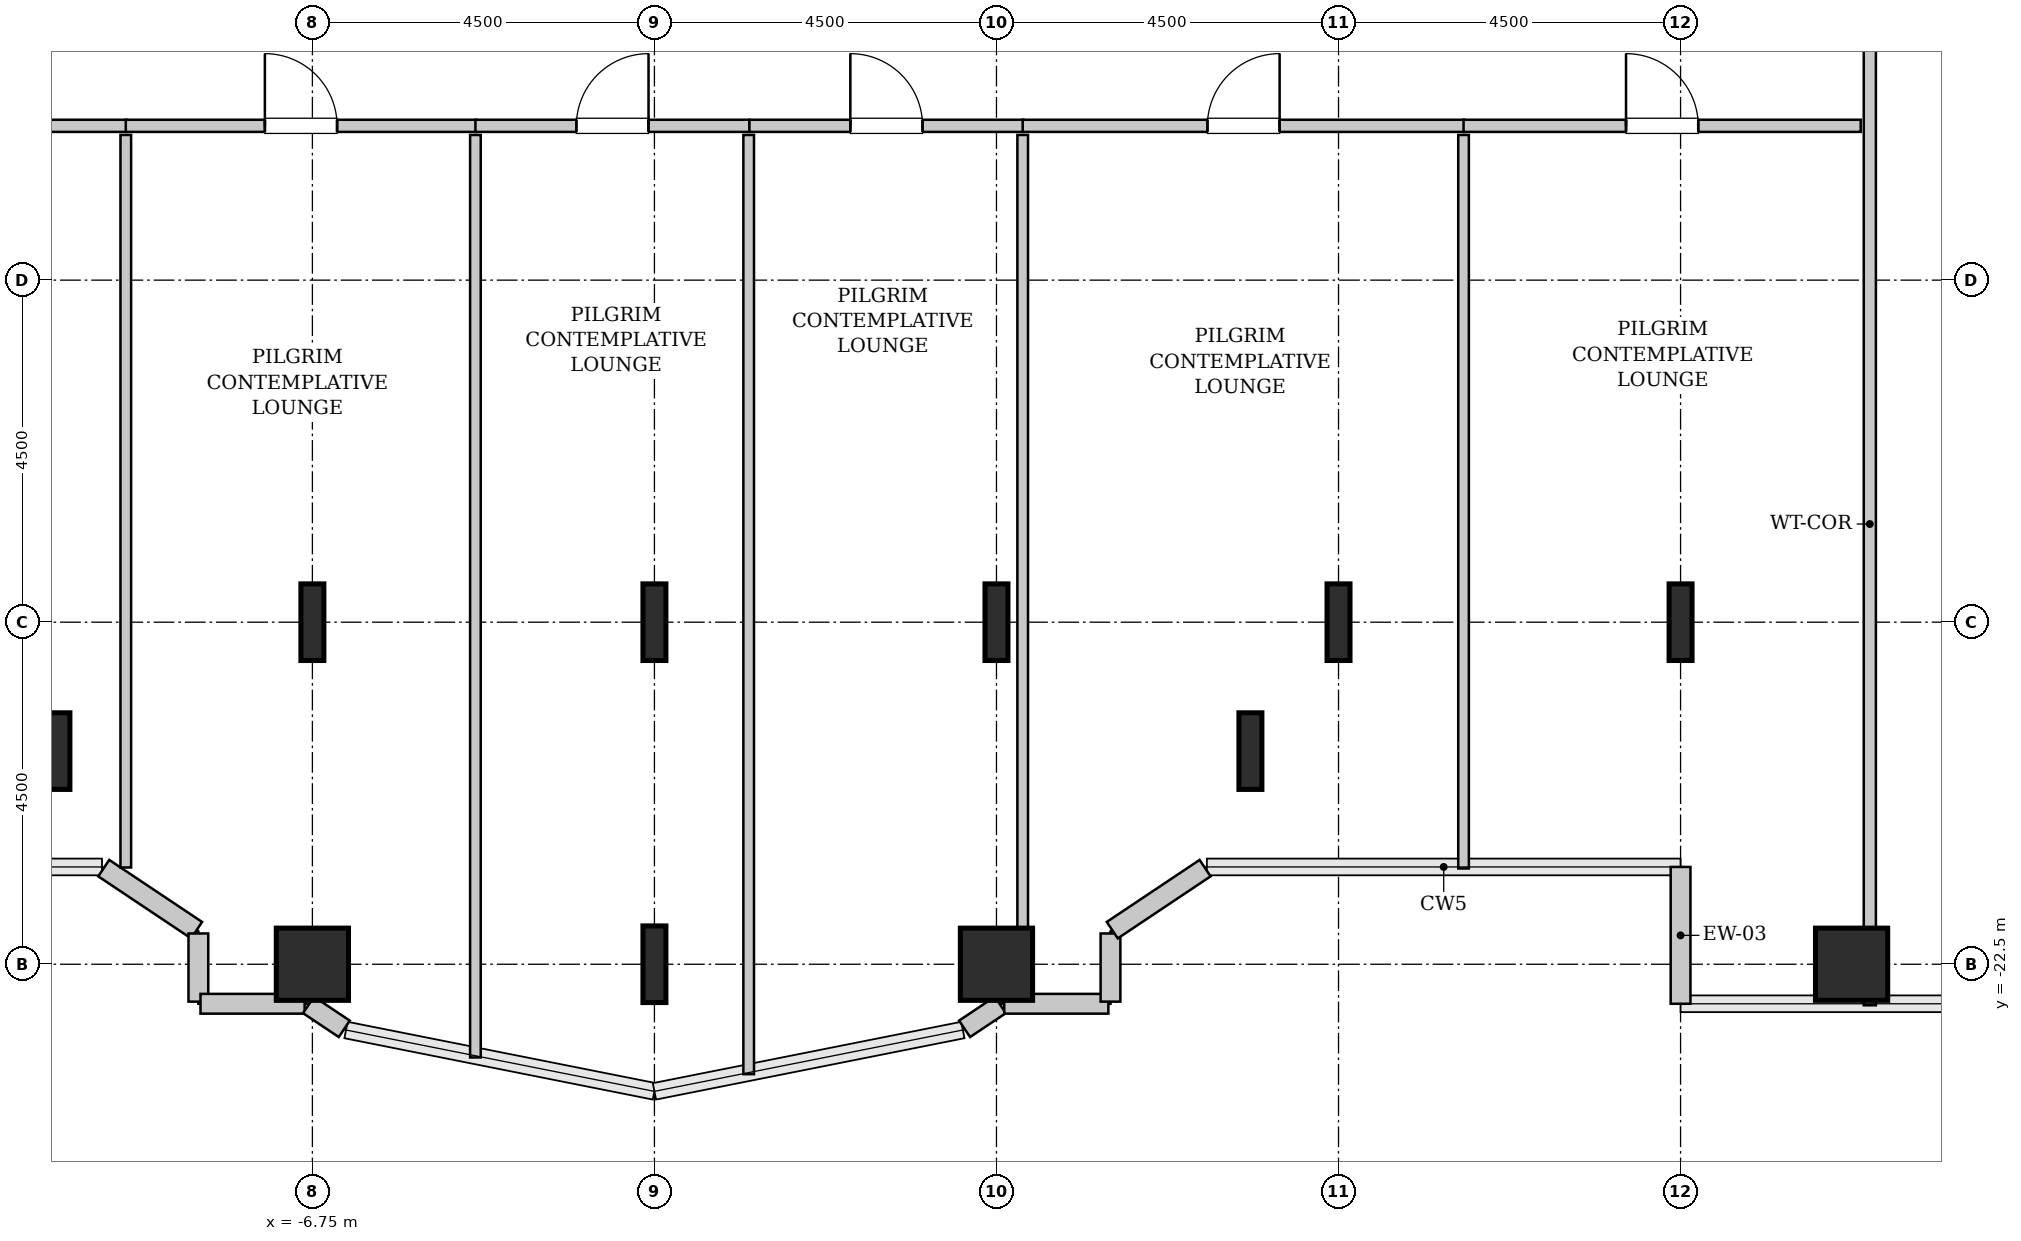
"""IFC4 building model, lengths in metres.
Left out: names, types, materials, properties, quantities, classifications, styles, units other than length and angle.
Written with IfcOpenShell. Run it as: python <this file> out.ifc"""

import sys

from ifc_helpers import new_model, si_unit, direction, frame, frame_2d, origin, origin_2d, place, context, subcontext, project, spatial, rectangle, hollow_rectangle, i_section, extrude, source, transform, mapped, element, fill, save


model = new_model("IFC4")
c1 = context("Model", 3, precision=1e-05, world=origin(), true_north=direction((0.0, 1.0)))
c2 = subcontext(c1, "Body", "Model", "MODEL_VIEW")
j1 = project(units=[si_unit("LENGTHUNIT", "METRE"), si_unit("PLANEANGLEUNIT", "RADIAN")], contexts=[c1])
p1 = place(None, origin())
s1 = spatial("IfcSite", under=j1, at=p1, CompositionType="ELEMENT")
p2 = place(p1, origin())
s2 = spatial("IfcBuilding", under=s1, at=p2, CompositionType="ELEMENT")
p3 = place(p2, frame((0.0, 0.0, 33.0)))
s3 = spatial("IfcBuildingStorey", under=s2, at=p3, CompositionType="ELEMENT", Elevation=33.0)
m1 = source(origin(), c2, "Body", "SweptSolid", [
    extrude(i_section(OverallWidth=0.302, OverallDepth=1.008, WebThickness=0.021, FlangeThickness=0.04, FilletRadius=0.03, at=origin_2d()), origin(), (0.0, 0.0, 1.0), 3.8),
])
p4 = place(p3, frame((-10.091, -19.696, 0.0), z_axis=(0.0, 0.0, 1.0), x_axis=(1.0, 0.0, 0.0)))
e1 = element("IfcColumn", 1, at=p4, inside=s3, PredefinedType="COLUMN", context=c2, shape_type="MappedRepresentation", body=[
    mapped(m1, transform((0.0, 0.0, 0.0), x_axis=(1.0, 0.0, 0.0), y_axis=(0.0, 1.0, 0.0), z_axis=(0.0, 0.0, 1.0), scale=1.0)),
])
m2 = source(origin(), c2, "Body", "SweptSolid", [
    extrude(hollow_rectangle(XDim=0.95, YDim=0.95, WallThickness=0.045, InnerFilletRadius=0.045, OuterFilletRadius=0.09, at=origin_2d()), origin(), (0.0, 0.0, 1.0), 3.8),
])
p5 = place(p3, frame((-6.75, -22.5, 0.0), z_axis=(0.0, 0.0, 1.0), x_axis=(1.0, 0.0, 0.0)))
e2 = element("IfcColumn", 2, at=p5, inside=s3, PredefinedType="COLUMN", context=c2, shape_type="MappedRepresentation", body=[
    mapped(m2, transform((0.0, 0.0, 0.0), x_axis=(1.0, 0.0, 0.0), y_axis=(0.0, 1.0, 0.0), z_axis=(0.0, 0.0, 1.0), scale=1.0)),
])
for number, where, z_axis, x_axis in (
    (3, (-6.75, -18.0, 0.0), (0.0, 0.0, 1.0), (1.0, 0.0, 0.0)),
    (4, (-2.25, -22.5, 0.0), (0.0, 0.0, 1.0), (1.0, 0.0, 0.0)),
    (5, (-2.25, -18.0, 0.0), (0.0, 0.0, 1.0), (1.0, 0.0, 0.0)),
):
    element("IfcColumn", number, at=place(p3, frame(where, z_axis=z_axis, x_axis=x_axis)), inside=s3, PredefinedType="COLUMN", context=c2, shape_type="MappedRepresentation", body=[
        mapped(m1, transform((0.0, 0.0, 0.0), x_axis=(1.0, 0.0, 0.0), y_axis=(0.0, 1.0, 0.0), z_axis=(0.0, 0.0, 1.0), scale=1.0)),
    ])
p6 = place(p3, frame((2.25, -22.5, 0.0), z_axis=(0.0, 0.0, 1.0), x_axis=(1.0, 0.0, 0.0)))
e6 = element("IfcColumn", 6, at=p6, inside=s3, PredefinedType="COLUMN", context=c2, shape_type="MappedRepresentation", body=[
    mapped(m2, transform((0.0, 0.0, 0.0), x_axis=(1.0, 0.0, 0.0), y_axis=(0.0, 1.0, 0.0), z_axis=(0.0, 0.0, 1.0), scale=1.0)),
])
for number, where, z_axis, x_axis in (
    (7, (2.25, -18.0, 0.0), (0.0, 0.0, 1.0), (1.0, 0.0, 0.0)),
    (8, (5.591, -19.696, 0.0), (0.0, 0.0, 1.0), (1.0, 0.0, 0.0)),
    (9, (6.75, -18.0, 0.0), (0.0, 0.0, 1.0), (1.0, 0.0, 0.0)),
    (10, (11.25, -18.0, 0.0), (0.0, 0.0, 1.0), (1.0, 0.0, 0.0)),
):
    element("IfcColumn", number, at=place(p3, frame(where, z_axis=z_axis, x_axis=x_axis)), inside=s3, PredefinedType="COLUMN", context=c2, shape_type="MappedRepresentation", body=[
        mapped(m1, transform((0.0, 0.0, 0.0), x_axis=(1.0, 0.0, 0.0), y_axis=(0.0, 1.0, 0.0), z_axis=(0.0, 0.0, 1.0), scale=1.0)),
    ])
p7 = place(p3, frame((13.5, -22.5, 0.0), z_axis=(0.0, 0.0, 1.0), x_axis=(1.0, 0.0, 0.0)))
e11 = element("IfcColumn", 11, at=p7, inside=s3, PredefinedType="COLUMN", context=c2, shape_type="MappedRepresentation", body=[
    mapped(m2, transform((0.0, 0.0, 0.0), x_axis=(1.0, 0.0, 0.0), y_axis=(0.0, 1.0, 0.0), z_axis=(0.0, 0.0, 1.0), scale=1.0)),
])
m3 = source(origin(), c2, "Body", "SweptSolid", [
    extrude(rectangle(XDim=1.8, YDim=0.26, at=frame_2d((0.9, 0.0))), origin(), (0.0, 0.0, 1.0), 3.55),
])
p8 = place(p3, frame((11.25, -21.22, 0.0), z_axis=(0.0, 0.0, 1.0), x_axis=(0.0, -1.0, 0.0)))
e12 = element("IfcWall", 12, at=p8, inside=s3, PredefinedType="SOLIDWALL", context=c2, shape_type="MappedRepresentation", body=[
    mapped(m3, transform((0.0, 0.0, 0.0), x_axis=(1.0, 0.0, 0.0), y_axis=(0.0, 1.0, 0.0), z_axis=(0.0, 0.0, 1.0), scale=1.0)),
])
m4 = source(origin(), c2, "Body", "SweptSolid", [
    extrude(rectangle(XDim=1.469, YDim=0.26, at=frame_2d((0.734, 0.0))), origin(), (0.0, 0.0, 1.0), 3.55),
])
p9 = place(p3, frame((-9.495, -21.236, 0.0), z_axis=(0.0, 0.0, 1.0), x_axis=(0.831461760506, -0.555581983884, 0.0)))
e13 = element("IfcWall", 13, at=p9, inside=s3, PredefinedType="SOLIDWALL", context=c2, shape_type="MappedRepresentation", body=[
    mapped(m4, transform((0.0, 0.0, 0.0), x_axis=(1.0, 0.0, 0.0), y_axis=(0.0, 1.0, 0.0), z_axis=(0.0, 0.0, 1.0), scale=1.0)),
])
m5 = source(origin(), c2, "Body", "SweptSolid", [
    extrude(rectangle(XDim=0.897, YDim=0.26, at=frame_2d((0.448, 0.0))), origin(), (0.0, 0.0, 1.0), 3.55),
])
p10 = place(p3, frame((-8.25, -22.095, 0.0), z_axis=(0.0, 0.0, 1.0), x_axis=(0.0, -1.0, 0.0)))
e14 = element("IfcWall", 14, at=p10, inside=s3, PredefinedType="SOLIDWALL", context=c2, shape_type="MappedRepresentation", body=[
    mapped(m5, transform((0.0, 0.0, 0.0), x_axis=(1.0, 0.0, 0.0), y_axis=(0.0, 1.0, 0.0), z_axis=(0.0, 0.0, 1.0), scale=1.0)),
])
m6 = source(origin(), c2, "Body", "SweptSolid", [
    extrude(rectangle(XDim=1.37, YDim=0.26, at=frame_2d((0.685, 0.0))), origin(), (0.0, 0.0, 1.0), 3.55),
])
p11 = place(p3, frame((-8.222, -23.02, 0.0), z_axis=(0.0, 0.0, 1.0), x_axis=(1.0, 0.0, 0.0)))
e15 = element("IfcWall", 15, at=p11, inside=s3, PredefinedType="SOLIDWALL", context=c2, shape_type="MappedRepresentation", body=[
    mapped(m6, transform((0.0, 0.0, 0.0), x_axis=(1.0, 0.0, 0.0), y_axis=(0.0, 1.0, 0.0), z_axis=(0.0, 0.0, 1.0), scale=1.0)),
])
m7 = source(origin(), c2, "Body", "SweptSolid", [
    extrude(rectangle(XDim=0.565, YDim=0.26, at=frame_2d((0.283, 0.0))), origin(), (0.0, 0.0, 1.0), 3.55),
])
for number, where, z_axis, x_axis in (
    (16, (-6.801, -23.036, 0.0), (0.0, 0.0, 1.0), (0.832, -0.555, 0.0)),
    (17, (1.831, -23.35, 0.0), (0.0, 0.0, 1.0), (0.832, 0.555, 0.0)),
):
    element("IfcWall", number, at=place(p3, frame(where, z_axis=z_axis, x_axis=x_axis)), inside=s3, PredefinedType="SOLIDWALL", context=c2, shape_type="MappedRepresentation", body=[
        mapped(m7, transform((0.0, 0.0, 0.0), x_axis=(1.0, 0.0, 0.0), y_axis=(0.0, 1.0, 0.0), z_axis=(0.0, 0.0, 1.0), scale=1.0)),
    ])
p12 = place(p3, frame((2.352, -23.02, 0.0), z_axis=(0.0, 0.0, 1.0), x_axis=(1.0, 0.0, 0.0)))
e18 = element("IfcWall", 18, at=p12, inside=s3, PredefinedType="SOLIDWALL", context=c2, shape_type="MappedRepresentation", body=[
    mapped(m6, transform((0.0, 0.0, 0.0), x_axis=(1.0, 0.0, 0.0), y_axis=(0.0, 1.0, 0.0), z_axis=(0.0, 0.0, 1.0), scale=1.0)),
])
p13 = place(p3, frame((3.75, -22.992, 0.0), z_axis=(0.0, 0.0, 1.0), x_axis=(0.0, 1.0, 0.0)))
e19 = element("IfcWall", 19, at=p13, inside=s3, PredefinedType="SOLIDWALL", context=c2, shape_type="MappedRepresentation", body=[
    mapped(m5, transform((0.0, 0.0, 0.0), x_axis=(1.0, 0.0, 0.0), y_axis=(0.0, 1.0, 0.0), z_axis=(0.0, 0.0, 1.0), scale=1.0)),
])
p14 = place(p3, frame((3.773, -22.052, 0.0), z_axis=(0.0, 0.0, 1.0), x_axis=(0.831461760506, 0.555581983884, 0.0)))
e20 = element("IfcWall", 20, at=p14, inside=s3, PredefinedType="SOLIDWALL", context=c2, shape_type="MappedRepresentation", body=[
    mapped(m4, transform((0.0, 0.0, 0.0), x_axis=(1.0, 0.0, 0.0), y_axis=(0.0, 1.0, 0.0), z_axis=(0.0, 0.0, 1.0), scale=1.0)),
])
m8 = source(origin(), c2, "Body", "SweptSolid", [
    extrude(rectangle(XDim=14.645, YDim=0.16, at=frame_2d((7.323, 0.0))), origin(), (0.0, 0.0, 1.0), 3.535),
])
p15 = place(p3, frame((13.74, -23.04, 0.0), z_axis=(0.0, 0.0, 1.0), x_axis=(0.0, 1.0, 0.0)))
e21 = element("IfcWall", 21, at=p15, inside=s3, PredefinedType="PARTITIONING", context=c2, shape_type="MappedRepresentation", body=[
    mapped(m8, transform((0.0, 0.0, 0.0), x_axis=(1.0, 0.0, 0.0), y_axis=(0.0, 1.0, 0.0), z_axis=(0.0, 0.0, 1.0), scale=1.0)),
])
p16 = place(p15, frame((12.613, 0.0, 0.0)))
e22 = element("IfcOpeningElement", 22, at=p16, cuts=e21, PredefinedType="OPENING", context=c2, shape_type="SweptSolid", body=[
    extrude(rectangle(XDim=0.95, YDim=2.1, at=frame_2d((0.475, 1.05))), frame((0.0, 0.09, 0.0), z_axis=(0.0, -1.0, 0.0), x_axis=(1.0, 0.0, 0.0)), (0.0, 0.0, 1.0), 0.18),
])
m9 = source(origin(), c2, "Body", "SweptSolid", [
    extrude(rectangle(XDim=4.425, YDim=0.16, at=frame_2d((2.212, 0.0))), origin(), (0.0, 0.0, 1.0), 3.535),
])
p17 = place(p3, frame((-13.62, -11.47, 0.0), z_axis=(0.0, 0.0, 1.0), x_axis=(1.0, 0.0, 0.0)))
e23 = element("IfcWall", 23, at=p17, inside=s3, PredefinedType="PARTITIONING", context=c2, shape_type="MappedRepresentation", body=[
    mapped(m9, transform((0.0, 0.0, 0.0), x_axis=(1.0, 0.0, 0.0), y_axis=(0.0, 1.0, 0.0), z_axis=(0.0, 0.0, 1.0), scale=1.0)),
])
p18 = place(p17, frame((1.738, 0.0, 0.0)))
e24 = element("IfcOpeningElement", 24, at=p18, cuts=e23, PredefinedType="OPENING", context=c2, shape_type="SweptSolid", body=[
    extrude(rectangle(XDim=0.95, YDim=2.1, at=frame_2d((0.475, 1.05))), frame((0.0, 0.09, 0.0), z_axis=(0.0, -1.0, 0.0), x_axis=(1.0, 0.0, 0.0)), (0.0, 0.0, 1.0), 0.18),
])
m10 = source(origin(), c2, "Body", "SweptSolid", [
    extrude(rectangle(XDim=9.637, YDim=0.14, at=frame_2d((4.818, 0.0))), origin(), (0.0, 0.0, 1.0), 3.535),
])
p19 = place(p3, frame((-9.205, -21.227, 0.0), z_axis=(0.0, 0.0, 1.0), x_axis=(0.0, 1.0, 0.0)))
e25 = element("IfcWall", 25, at=p19, inside=s3, PredefinedType="PARTITIONING", context=c2, shape_type="MappedRepresentation", body=[
    mapped(m10, transform((0.0, 0.0, 0.0), x_axis=(1.0, 0.0, 0.0), y_axis=(0.0, 1.0, 0.0), z_axis=(0.0, 0.0, 1.0), scale=1.0)),
])
m11 = source(origin(), c2, "Body", "SweptSolid", [
    extrude(rectangle(XDim=4.61, YDim=0.16, at=frame_2d((2.305, 0.0))), origin(), (0.0, 0.0, 1.0), 3.535),
])
p20 = place(p3, frame((-9.205, -11.47, 0.0), z_axis=(0.0, 0.0, 1.0), x_axis=(1.0, 0.0, 0.0)))
e26 = element("IfcWall", 26, at=p20, inside=s3, PredefinedType="PARTITIONING", context=c2, shape_type="MappedRepresentation", body=[
    mapped(m11, transform((0.0, 0.0, 0.0), x_axis=(1.0, 0.0, 0.0), y_axis=(0.0, 1.0, 0.0), z_axis=(0.0, 0.0, 1.0), scale=1.0)),
])
p21 = place(p20, frame((1.83, 0.0, 0.0)))
e27 = element("IfcOpeningElement", 27, at=p21, cuts=e26, PredefinedType="OPENING", context=c2, shape_type="SweptSolid", body=[
    extrude(rectangle(XDim=0.95, YDim=2.1, at=frame_2d((0.475, 1.05))), frame((0.0, 0.09, 0.0), z_axis=(0.0, -1.0, 0.0), x_axis=(1.0, 0.0, 0.0)), (0.0, 0.0, 1.0), 0.18),
])
m12 = source(origin(), c2, "Body", "SweptSolid", [
    extrude(rectangle(XDim=12.136, YDim=0.14, at=frame_2d((6.068, 0.0))), origin(), (0.0, 0.0, 1.0), 3.535),
])
p22 = place(p3, frame((-4.605, -23.726, 0.0), z_axis=(0.0, 0.0, 1.0), x_axis=(0.0, 1.0, 0.0)))
e28 = element("IfcWall", 28, at=p22, inside=s3, PredefinedType="PARTITIONING", context=c2, shape_type="MappedRepresentation", body=[
    mapped(m12, transform((0.0, 0.0, 0.0), x_axis=(1.0, 0.0, 0.0), y_axis=(0.0, 1.0, 0.0), z_axis=(0.0, 0.0, 1.0), scale=1.0)),
])
m13 = source(origin(), c2, "Body", "SweptSolid", [
    extrude(rectangle(XDim=3.605, YDim=0.16, at=frame_2d((1.802, 0.0))), origin(), (0.0, 0.0, 1.0), 3.535),
])
p23 = place(p3, frame((-4.605, -11.47, 0.0), z_axis=(0.0, 0.0, 1.0), x_axis=(1.0, 0.0, 0.0)))
e29 = element("IfcWall", 29, at=p23, inside=s3, PredefinedType="PARTITIONING", context=c2, shape_type="MappedRepresentation", body=[
    mapped(m13, transform((0.0, 0.0, 0.0), x_axis=(1.0, 0.0, 0.0), y_axis=(0.0, 1.0, 0.0), z_axis=(0.0, 0.0, 1.0), scale=1.0)),
])
p24 = place(p23, frame((1.327, 0.0, 0.0)))
e30 = element("IfcOpeningElement", 30, at=p24, cuts=e29, PredefinedType="OPENING", context=c2, shape_type="SweptSolid", body=[
    extrude(rectangle(XDim=0.95, YDim=2.1, at=frame_2d((0.475, 1.05))), frame((0.0, 0.09, 0.0), z_axis=(0.0, -1.0, 0.0), x_axis=(1.0, 0.0, 0.0)), (0.0, 0.0, 1.0), 0.18),
])
m14 = source(origin(), c2, "Body", "SweptSolid", [
    extrude(rectangle(XDim=12.356, YDim=0.14, at=frame_2d((6.178, 0.0))), origin(), (0.0, 0.0, 1.0), 3.535),
])
p25 = place(p3, frame((-1.01, -23.946, 0.0), z_axis=(0.0, 0.0, 1.0), x_axis=(0.0, 1.0, 0.0)))
e31 = element("IfcWall", 31, at=p25, inside=s3, PredefinedType="PARTITIONING", context=c2, shape_type="MappedRepresentation", body=[
    mapped(m14, transform((0.0, 0.0, 0.0), x_axis=(1.0, 0.0, 0.0), y_axis=(0.0, 1.0, 0.0), z_axis=(0.0, 0.0, 1.0), scale=1.0)),
])
p26 = place(p3, frame((-1.0, -11.47, 0.0), z_axis=(0.0, 0.0, 1.0), x_axis=(1.0, 0.0, 0.0)))
e32 = element("IfcWall", 32, at=p26, inside=s3, PredefinedType="PARTITIONING", context=c2, shape_type="MappedRepresentation", body=[
    mapped(m13, transform((0.0, 0.0, 0.0), x_axis=(1.0, 0.0, 0.0), y_axis=(0.0, 1.0, 0.0), z_axis=(0.0, 0.0, 1.0), scale=1.0)),
])
p27 = place(p26, frame((1.327, 0.0, 0.0)))
e33 = element("IfcOpeningElement", 33, at=p27, cuts=e32, PredefinedType="OPENING", context=c2, shape_type="SweptSolid", body=[
    extrude(rectangle(XDim=0.95, YDim=2.1, at=frame_2d((0.475, 1.05))), frame((0.0, 0.09, 0.0), z_axis=(0.0, -1.0, 0.0), x_axis=(1.0, 0.0, 0.0)), (0.0, 0.0, 1.0), 0.18),
])
m15 = source(origin(), c2, "Body", "SweptSolid", [
    extrude(rectangle(XDim=11.26, YDim=0.14, at=frame_2d((5.63, 0.0))), origin(), (0.0, 0.0, 1.0), 2.825),
])
p28 = place(p3, frame((2.595, -22.85, 0.0), z_axis=(0.0, 0.0, 1.0), x_axis=(0.0, 1.0, 0.0)))
e34 = element("IfcWall", 34, at=p28, inside=s3, PredefinedType="PARTITIONING", context=c2, shape_type="MappedRepresentation", body=[
    mapped(m15, transform((0.0, 0.0, 0.0), x_axis=(1.0, 0.0, 0.0), y_axis=(0.0, 1.0, 0.0), z_axis=(0.0, 0.0, 1.0), scale=1.0)),
])
m16 = source(origin(), c2, "Body", "SweptSolid", [
    extrude(rectangle(XDim=5.81, YDim=0.16, at=frame_2d((2.905, 0.0))), origin(), (0.0, 0.0, 1.0), 3.535),
])
p29 = place(p3, frame((2.595, -11.47, 0.0), z_axis=(0.0, 0.0, 1.0), x_axis=(1.0, 0.0, 0.0)))
e35 = element("IfcWall", 35, at=p29, inside=s3, PredefinedType="PARTITIONING", context=c2, shape_type="MappedRepresentation", body=[
    mapped(m16, transform((0.0, 0.0, 0.0), x_axis=(1.0, 0.0, 0.0), y_axis=(0.0, 1.0, 0.0), z_axis=(0.0, 0.0, 1.0), scale=1.0)),
])
p30 = place(p29, frame((2.43, 0.0, 0.0)))
e36 = element("IfcOpeningElement", 36, at=p30, cuts=e35, PredefinedType="OPENING", context=c2, shape_type="SweptSolid", body=[
    extrude(rectangle(XDim=0.95, YDim=2.1, at=frame_2d((0.475, 1.05))), frame((0.0, 0.09, 0.0), z_axis=(0.0, -1.0, 0.0), x_axis=(1.0, 0.0, 0.0)), (0.0, 0.0, 1.0), 0.18),
])
m17 = source(origin(), c2, "Body", "SweptSolid", [
    extrude(rectangle(XDim=9.65, YDim=0.14, at=frame_2d((4.825, 0.0))), origin(), (0.0, 0.0, 1.0), 3.535),
])
p31 = place(p3, frame((8.395, -21.24, 0.0), z_axis=(0.0, 0.0, 1.0), x_axis=(0.0, 1.0, 0.0)))
e37 = element("IfcWall", 37, at=p31, inside=s3, PredefinedType="PARTITIONING", context=c2, shape_type="MappedRepresentation", body=[
    mapped(m17, transform((0.0, 0.0, 0.0), x_axis=(1.0, 0.0, 0.0), y_axis=(0.0, 1.0, 0.0), z_axis=(0.0, 0.0, 1.0), scale=1.0)),
])
m18 = source(origin(), c2, "Body", "SweptSolid", [
    extrude(rectangle(XDim=5.225, YDim=0.16, at=frame_2d((2.613, 0.0))), origin(), (0.0, 0.0, 1.0), 3.535),
])
p32 = place(p3, frame((8.395, -11.47, 0.0), z_axis=(0.0, 0.0, 1.0), x_axis=(1.0, 0.0, 0.0)))
e38 = element("IfcWall", 38, at=p32, inside=s3, PredefinedType="PARTITIONING", context=c2, shape_type="MappedRepresentation", body=[
    mapped(m18, transform((0.0, 0.0, 0.0), x_axis=(1.0, 0.0, 0.0), y_axis=(0.0, 1.0, 0.0), z_axis=(0.0, 0.0, 1.0), scale=1.0)),
])
p33 = place(p32, frame((2.137, 0.0, 0.0)))
e39 = element("IfcOpeningElement", 39, at=p33, cuts=e38, PredefinedType="OPENING", context=c2, shape_type="SweptSolid", body=[
    extrude(rectangle(XDim=0.95, YDim=2.1, at=frame_2d((0.475, 1.05))), frame((0.0, 0.09, 0.0), z_axis=(0.0, -1.0, 0.0), x_axis=(1.0, 0.0, 0.0)), (0.0, 0.0, 1.0), 0.18),
])
m19 = source(origin(), c2, "Body", "SweptSolid", [
    extrude(rectangle(XDim=0.95, YDim=2.1, at=frame_2d((0.475, 1.05))), frame((0.0, 0.025, 0.0), z_axis=(0.0, -1.0, 0.0), x_axis=(1.0, 0.0, 0.0)), (0.0, 0.0, 1.0), 0.05),
])
p34 = place(p21, origin())
e40 = element("IfcDoor", 40, at=p34, inside=s3, OperationType="SINGLE_SWING_LEFT", PredefinedType="DOOR", context=c2, shape_type="MappedRepresentation", body=[
    mapped(m19, transform((0.0, 0.0, 0.0), x_axis=(1.0, 0.0, 0.0), y_axis=(0.0, 1.0, 0.0), z_axis=(0.0, 0.0, 1.0), scale=1.0)),
])
fill(e27, e40)
p35 = place(p24, origin())
e41 = element("IfcDoor", 41, at=p35, inside=s3, OperationType="SINGLE_SWING_RIGHT", PredefinedType="DOOR", context=c2, shape_type="MappedRepresentation", body=[
    mapped(m19, transform((0.0, 0.0, 0.0), x_axis=(1.0, 0.0, 0.0), y_axis=(0.0, 1.0, 0.0), z_axis=(0.0, 0.0, 1.0), scale=1.0)),
])
fill(e30, e41)
p36 = place(p27, origin())
e42 = element("IfcDoor", 42, at=p36, inside=s3, OperationType="SINGLE_SWING_LEFT", PredefinedType="DOOR", context=c2, shape_type="MappedRepresentation", body=[
    mapped(m19, transform((0.0, 0.0, 0.0), x_axis=(1.0, 0.0, 0.0), y_axis=(0.0, 1.0, 0.0), z_axis=(0.0, 0.0, 1.0), scale=1.0)),
])
fill(e33, e42)
p37 = place(p30, origin())
e43 = element("IfcDoor", 43, at=p37, inside=s3, OperationType="SINGLE_SWING_RIGHT", PredefinedType="DOOR", context=c2, shape_type="MappedRepresentation", body=[
    mapped(m19, transform((0.0, 0.0, 0.0), x_axis=(1.0, 0.0, 0.0), y_axis=(0.0, 1.0, 0.0), z_axis=(0.0, 0.0, 1.0), scale=1.0)),
])
fill(e36, e43)
p38 = place(p33, origin())
e44 = element("IfcDoor", 44, at=p38, inside=s3, OperationType="SINGLE_SWING_LEFT", PredefinedType="DOOR", context=c2, shape_type="MappedRepresentation", body=[
    mapped(m19, transform((0.0, 0.0, 0.0), x_axis=(1.0, 0.0, 0.0), y_axis=(0.0, 1.0, 0.0), z_axis=(0.0, 0.0, 1.0), scale=1.0)),
])
fill(e39, e44)
save(model, sys.argv[1])
